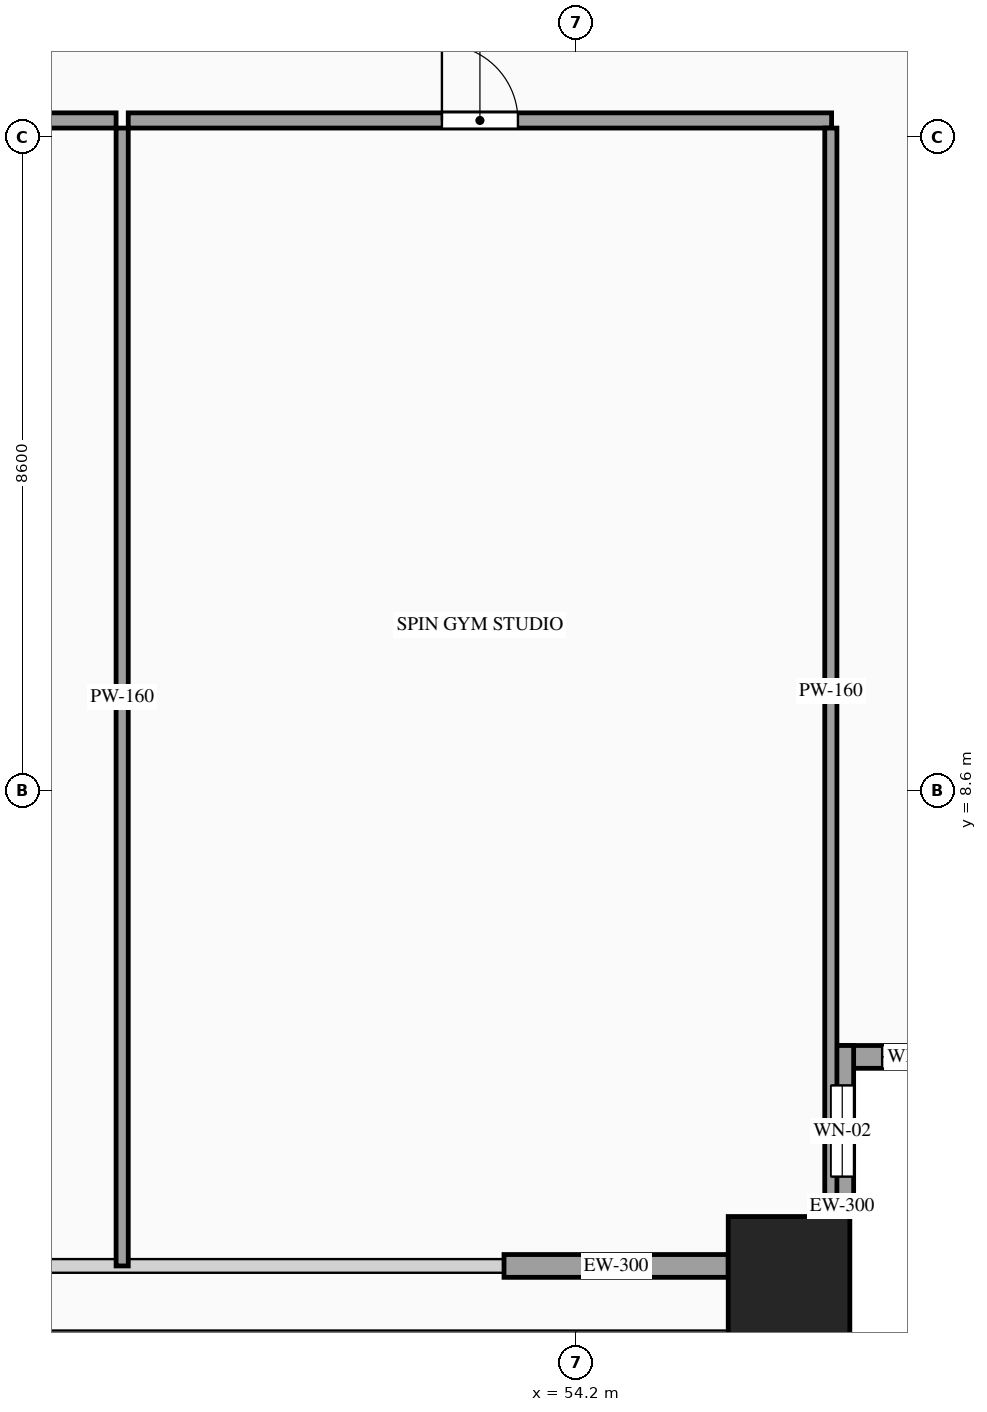
"""IFC4 building model, lengths in metres.
Left out: names, types, materials, properties, quantities, classifications, styles, units other than length and angle.
Written with IfcOpenShell. Run it as: python <this file> out.ifc"""

import sys

from ifc_helpers import new_model, si_unit, direction, frame, frame_2d, origin, origin_2d, place, context, subcontext, project, spatial, rectangle, hollow_rectangle, extrude, source, transform, mapped, element, fill, save


model = new_model("IFC4")
c1 = context("Model", 3, precision=1e-05, world=origin(), true_north=direction((0.0, 1.0)))
c2 = subcontext(c1, "Body", "Model", "MODEL_VIEW")
j1 = project(units=[si_unit("LENGTHUNIT", "METRE"), si_unit("PLANEANGLEUNIT", "RADIAN")], contexts=[c1])
p1 = place(None, origin())
s1 = spatial("IfcSite", under=j1, at=p1, CompositionType="ELEMENT")
p2 = place(p1, origin())
s2 = spatial("IfcBuilding", under=s1, at=p2, CompositionType="ELEMENT")
p3 = place(p2, frame((0.0, 0.0, 141.6)))
s3 = spatial("IfcBuildingStorey", under=s2, at=p3, CompositionType="ELEMENT", Elevation=141.6)
m1 = source(origin(), c2, "Body", "SweptSolid", [
    extrude(hollow_rectangle(XDim=1.6, YDim=1.6, WallThickness=0.07, at=origin_2d()), origin(), (0.0, 0.0, 1.0), 3.6),
])
p4 = place(p3, frame((57.0, 2.2, 0.0), z_axis=(0.0, 0.0, 1.0), x_axis=(1.0, 0.0, 0.0)))
e1 = element("IfcColumn", 1, at=p4, inside=s3, PredefinedType="COLUMN", context=c2, shape_type="MappedRepresentation", body=[
    mapped(m1, transform((0.0, 0.0, 0.0), scale=1.0)),
])
p5 = place(p3, frame((57.55, 5.1, 0.0), z_axis=(0.0, 0.0, 1.0), x_axis=(1.0, 0.0, 0.0)))
e2 = element("IfcWall", 2, at=p5, inside=s3, PredefinedType="SOLIDWALL", context=c2, shape_type="SweptSolid", body=[
    extrude(rectangle(XDim=2.25, YDim=0.3, at=frame_2d((1.125, 0.0))), origin(), (0.0, 0.0, 1.0), 3.38),
])
p6 = place(p5, frame((0.675, 0.0, 0.85)))
e3 = element("IfcOpeningElement", 3, at=p6, cuts=e2, PredefinedType="OPENING", context=c2, shape_type="SweptSolid", body=[
    extrude(rectangle(XDim=0.9, YDim=1.5, at=frame_2d((0.45, 0.75))), frame((0.0, 0.165, 0.0), z_axis=(0.0, -1.0, 0.0), x_axis=(1.0, 0.0, 0.0)), (0.0, 0.0, 1.0), 0.33),
])
p7 = place(p3, frame((57.7, 3.0, 0.0), z_axis=(0.0, 0.0, 1.0), x_axis=(0.0, 1.0, 0.0)))
e4 = element("IfcWall", 4, at=p7, inside=s3, PredefinedType="SOLIDWALL", context=c2, shape_type="SweptSolid", body=[
    extrude(rectangle(XDim=2.25, YDim=0.3, at=frame_2d((1.125, 0.0))), origin(), (0.0, 0.0, 1.0), 3.38),
])
p8 = place(p7, frame((0.525, 0.0, 0.85)))
e5 = element("IfcOpeningElement", 5, at=p8, cuts=e4, PredefinedType="OPENING", context=c2, shape_type="SweptSolid", body=[
    extrude(rectangle(XDim=1.2, YDim=2.1, at=frame_2d((0.6, 1.05))), frame((0.0, 0.165, 0.0), z_axis=(0.0, -1.0, 0.0), x_axis=(1.0, 0.0, 0.0)), (0.0, 0.0, 1.0), 0.33),
])
m2 = source(origin(), c2, "Body", "SweptSolid", [
    extrude(rectangle(XDim=2.95, YDim=0.3, at=frame_2d((1.475, 0.0))), origin(), (0.0, 0.0, 1.0), 2.775),
])
p9 = place(p3, frame((53.25, 2.35, 0.0), z_axis=(0.0, 0.0, 1.0), x_axis=(1.0, 0.0, 0.0)))
e6 = element("IfcWall", 6, at=p9, inside=s3, PredefinedType="SOLIDWALL", context=c2, shape_type="MappedRepresentation", body=[
    mapped(m2, transform((0.0, 0.0, 0.0), scale=1.0)),
])
p10 = place(p3, frame((43.042, 17.42, 0.0), z_axis=(0.0, 0.0, 1.0), x_axis=(1.0, 0.0, 0.0)))
e7 = element("IfcWall", 7, at=p10, inside=s3, PredefinedType="PARTITIONING", context=c2, shape_type="SweptSolid", body=[
    extrude(rectangle(XDim=5.104, YDim=0.2, at=frame_2d((2.552, 0.0))), origin(), (0.0, 0.0, 1.0), 3.38),
])
p11 = place(p10, frame((2.052, 0.0, 0.0)))
e8 = element("IfcOpeningElement", 8, at=p11, cuts=e7, PredefinedType="OPENING", context=c2, shape_type="SweptSolid", body=[
    extrude(rectangle(XDim=1.0, YDim=2.2, at=frame_2d((0.5, 1.1))), frame((0.0, 0.115, 0.0), z_axis=(0.0, -1.0, 0.0), x_axis=(1.0, 0.0, 0.0)), (0.0, 0.0, 1.0), 0.23),
])
m3 = source(origin(), c2, "Body", "SweptSolid", [
    extrude(rectangle(XDim=14.97, YDim=0.16, at=frame_2d((7.485, 0.0))), origin(), (0.0, 0.0, 1.0), 3.38),
])
p12 = place(p3, frame((48.226, 2.35, 0.0), z_axis=(0.0, 0.0, 1.0), x_axis=(0.0, 1.0, 0.0)))
e9 = element("IfcWall", 9, at=p12, inside=s3, PredefinedType="PARTITIONING", context=c2, shape_type="MappedRepresentation", body=[
    mapped(m3, transform((0.0, 0.0, 0.0), scale=1.0)),
])
p13 = place(p3, frame((48.306, 17.42, 0.0), z_axis=(0.0, 0.0, 1.0), x_axis=(1.0, 0.0, 0.0)))
e10 = element("IfcWall", 10, at=p13, inside=s3, PredefinedType="PARTITIONING", context=c2, shape_type="SweptSolid", body=[
    extrude(rectangle(XDim=9.254, YDim=0.2, at=frame_2d((4.627, 0.0))), origin(), (0.0, 0.0, 1.0), 3.38),
])
p14 = place(p13, frame((4.127, 0.0, 0.0)))
e11 = element("IfcOpeningElement", 11, at=p14, cuts=e10, PredefinedType="OPENING", context=c2, shape_type="SweptSolid", body=[
    extrude(rectangle(XDim=1.0, YDim=2.2, at=frame_2d((0.5, 1.1))), frame((0.0, 0.115, 0.0), z_axis=(0.0, -1.0, 0.0), x_axis=(1.0, 0.0, 0.0)), (0.0, 0.0, 1.0), 0.23),
])
m4 = source(origin(), c2, "Body", "SweptSolid", [
    extrude(rectangle(XDim=14.82, YDim=0.16, at=frame_2d((7.41, 0.0))), origin(), (0.0, 0.0, 1.0), 3.38),
])
p15 = place(p3, frame((57.55, 2.5, 0.0), z_axis=(0.0, 0.0, 1.0), x_axis=(0.0, 1.0, 0.0)))
e12 = element("IfcWall", 12, at=p15, inside=s3, PredefinedType="PARTITIONING", context=c2, shape_type="MappedRepresentation", body=[
    mapped(m4, transform((0.0, 0.0, 0.0), scale=1.0)),
])
m5 = source(origin(), c2, "Body", "SweptSolid", [
    extrude(rectangle(XDim=0.9, YDim=1.5, at=frame_2d((0.45, 0.75))), frame((0.0, 0.03, 0.0), z_axis=(0.0, -1.0, 0.0), x_axis=(1.0, 0.0, 0.0)), (0.0, 0.0, 1.0), 0.06),
])
p16 = place(p6, origin())
e13 = element("IfcWindow", 13, at=p16, inside=s3, PartitioningType="SINGLE_PANEL", PredefinedType="WINDOW", context=c2, shape_type="MappedRepresentation", body=[
    mapped(m5, transform((0.0, 0.0, 0.0), scale=1.0)),
])
fill(e3, e13)
m6 = source(origin(), c2, "Body", "SweptSolid", [
    extrude(rectangle(XDim=1.2, YDim=2.1, at=frame_2d((0.6, 1.05))), frame((0.0, 0.03, 0.0), z_axis=(0.0, -1.0, 0.0), x_axis=(1.0, 0.0, 0.0)), (0.0, 0.0, 1.0), 0.06),
])
p17 = place(p8, origin())
e14 = element("IfcWindow", 14, at=p17, inside=s3, PartitioningType="SINGLE_PANEL", PredefinedType="WINDOW", context=c2, shape_type="MappedRepresentation", body=[
    mapped(m6, transform((0.0, 0.0, 0.0), scale=1.0)),
])
fill(e5, e14)
m7 = source(origin(), c2, "Body", "SweptSolid", [
    extrude(rectangle(XDim=1.0, YDim=2.2, at=frame_2d((0.5, 1.1))), frame((0.0, 0.025, 0.0), z_axis=(0.0, -1.0, 0.0), x_axis=(1.0, 0.0, 0.0)), (0.0, 0.0, 1.0), 0.05),
])
p18 = place(p14, origin())
e15 = element("IfcDoor", 15, at=p18, inside=s3, OperationType="SINGLE_SWING_LEFT", PredefinedType="DOOR", context=c2, shape_type="MappedRepresentation", body=[
    mapped(m7, transform((0.0, 0.0, 0.0), scale=1.0)),
])
fill(e11, e15)
save(model, sys.argv[1])
